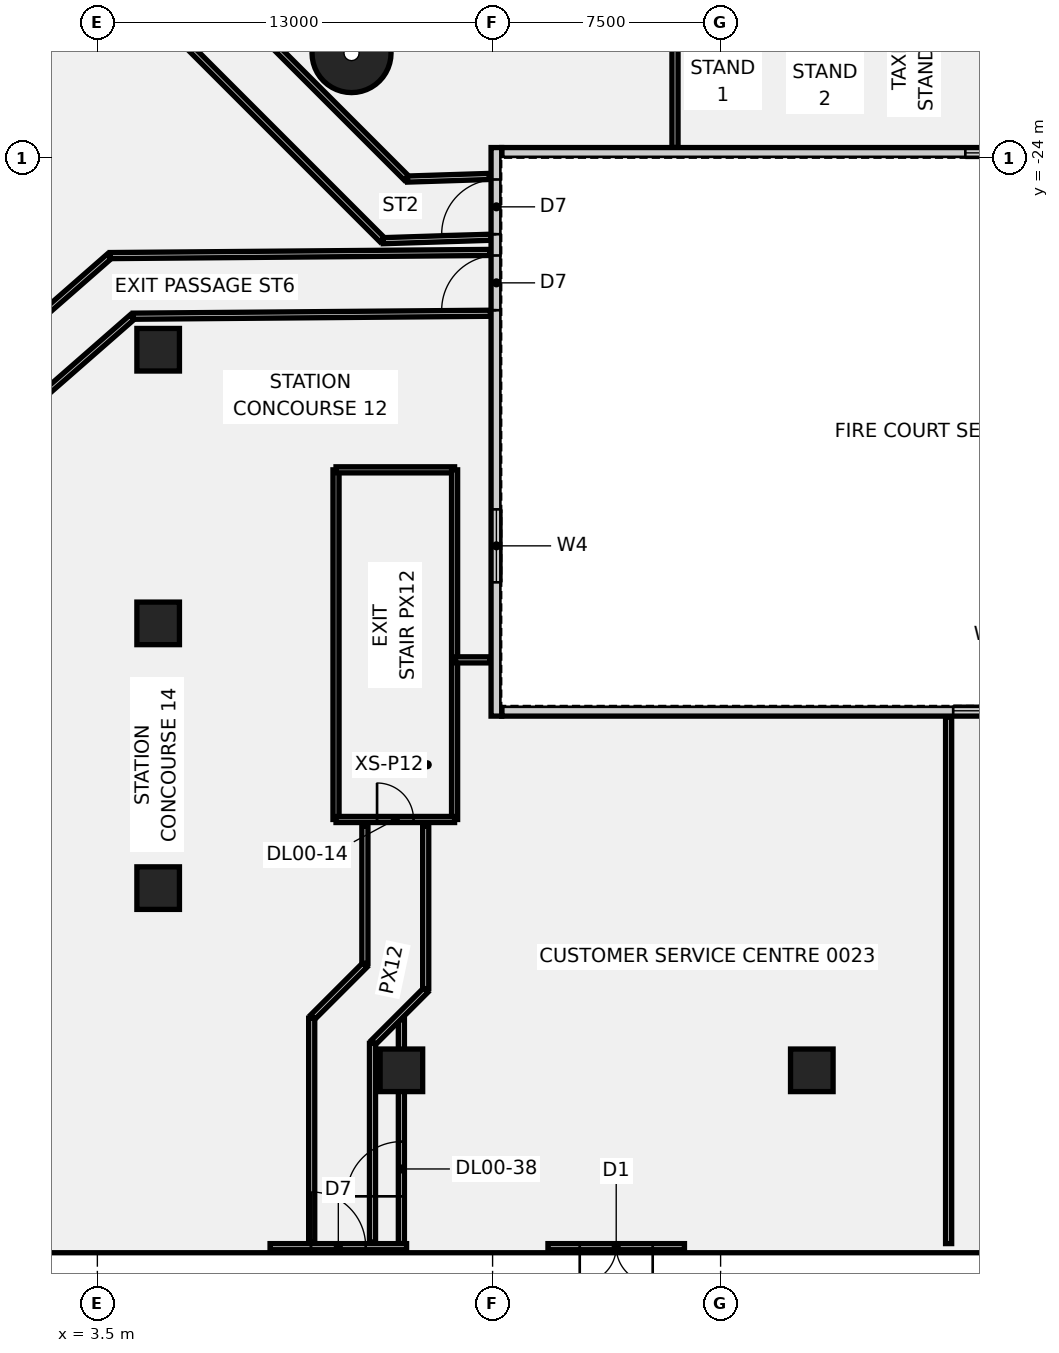
"""IFC4 building model, lengths in metres.
Left out: names, types, materials, properties, quantities, classifications, styles, units other than length and angle.
Written with IfcOpenShell. Run it as: python <this file> out.ifc"""

import sys

from ifc_helpers import new_model, si_unit, direction, frame, frame_2d, origin, origin_2d, place, context, subcontext, project, spatial, rectangle, circle, extrude, element, fill, save


model = new_model("IFC4")
c1 = context("Model", 3, precision=1e-05, world=origin(), true_north=direction((0.0, 1.0)))
c2 = subcontext(c1, "Body", "Model", "MODEL_VIEW")
j1 = project(units=[si_unit("LENGTHUNIT", "METRE"), si_unit("PLANEANGLEUNIT", "RADIAN")], contexts=[c1])
p1 = place(None, origin())
s1 = spatial("IfcSite", under=j1, at=p1, CompositionType="ELEMENT")
p2 = place(p1, origin())
s2 = spatial("IfcBuilding", under=s1, at=p2, CompositionType="ELEMENT")
p3 = place(p2, origin())
s3 = spatial("IfcBuildingStorey", under=s2, at=p3, CompositionType="ELEMENT", Elevation=0.0)
p4 = place(p3, frame((11.86, -20.543, -0.55), z_axis=(0.0, 0.0, 1.0), x_axis=(1.0, 0.0, 0.0)))
e1 = element("IfcColumn", 1, at=p4, inside=s3, PredefinedType="COLUMN", context=c2, shape_type="SweptSolid", body=[
    extrude(circle(Radius=1.3, at=origin_2d()), origin(), (0.0, 0.0, 1.0), 9.05),
])
for number, where, z_axis, x_axis in (
    (2, (5.5, -39.3, -0.55), (0.0, 0.0, 1.0), (1.0, 0.0, 0.0)),
    (3, (5.5, -30.3, -0.55), (0.0, 0.0, 1.0), (1.0, 0.0, 0.0)),
    (4, (5.5, -48.008, -0.55), (0.0, 0.0, 1.0), (1.0, 0.0, 0.0)),
    (5, (13.5, -54.0, -0.55), (0.0, 0.0, 1.0), (1.0, 0.0, 0.0)),
    (6, (27.0, -54.0, -0.55), (0.0, 0.0, 1.0), (1.0, 0.0, 0.0)),
):
    element("IfcColumn", number, at=place(p3, frame(where, z_axis=z_axis, x_axis=x_axis)), inside=s3, PredefinedType="COLUMN", context=c2, shape_type="SweptSolid", body=[
        extrude(rectangle(XDim=1.4, YDim=1.4, at=origin_2d()), origin(), (0.0, 0.0, 1.0), 9.05),
    ])
p5 = place(p3, frame((11.35, -45.75, 0.0), z_axis=(0.0, 0.0, 1.0), x_axis=(0.0, 1.0, 0.0)))
e7 = element("IfcWall", 7, at=p5, inside=s3, PredefinedType="PARTITIONING", context=c2, shape_type="SweptSolid", body=[
    extrude(rectangle(XDim=11.5, YDim=0.2, at=frame_2d((5.75, 0.0))), origin(), (0.0, 0.0, 1.0), 8.5),
])
p6 = place(p3, frame((11.35, -34.25, 0.0), z_axis=(0.0, 0.0, 1.0), x_axis=(1.0, 0.0, 0.0)))
e8 = element("IfcWall", 8, at=p6, inside=s3, PredefinedType="PARTITIONING", context=c2, shape_type="SweptSolid", body=[
    extrude(rectangle(XDim=3.9, YDim=0.2, at=frame_2d((1.95, 0.0))), origin(), (0.0, 0.0, 1.0), 8.5),
])
p7 = place(p3, frame((15.25, -45.75, 0.0), z_axis=(0.0, 0.0, 1.0), x_axis=(0.0, 1.0, 0.0)))
e9 = element("IfcWall", 9, at=p7, inside=s3, PredefinedType="PARTITIONING", context=c2, shape_type="SweptSolid", body=[
    extrude(rectangle(XDim=11.5, YDim=0.2, at=frame_2d((5.75, 0.0))), origin(), (0.0, 0.0, 1.0), 8.5),
])
p8 = place(p3, frame((11.35, -45.75, 0.0), z_axis=(0.0, 0.0, 1.0), x_axis=(1.0, 0.0, 0.0)))
e10 = element("IfcWall", 10, at=p8, inside=s3, PredefinedType="PARTITIONING", context=c2, shape_type="SweptSolid", body=[
    extrude(rectangle(XDim=3.9, YDim=0.2, at=frame_2d((1.95, 0.0))), origin(), (0.0, 0.0, 1.0), 8.5),
])
p9 = place(p8, frame((1.35, 0.0, 0.0)))
e11 = element("IfcOpeningElement", 11, at=p9, cuts=e10, PredefinedType="OPENING", context=c2, shape_type="SweptSolid", body=[
    extrude(rectangle(XDim=1.2, YDim=2.1, at=frame_2d((0.6, 1.05))), frame((0.0, 0.11, 0.0), z_axis=(0.0, -1.0, 0.0), x_axis=(1.0, 0.0, 0.0)), (0.0, 0.0, 1.0), 0.22),
])
p10 = place(p3, frame((13.5, -59.699, 0.0), z_axis=(0.0, 0.0, 1.0), x_axis=(0.0, 1.0, 0.0)))
e12 = element("IfcWall", 12, at=p10, inside=s3, PredefinedType="PARTITIONING", context=c2, shape_type="SweptSolid", body=[
    extrude(rectangle(XDim=7.365, YDim=0.2, at=frame_2d((3.683, 0.0))), origin(), (0.0, 0.0, 1.0), 8.5),
])
p11 = place(p10, frame((1.554, 0.0, 0.0)))
e13 = element("IfcOpeningElement", 13, at=p11, cuts=e12, PredefinedType="OPENING", context=c2, shape_type="SweptSolid", body=[
    extrude(rectangle(XDim=1.8, YDim=2.1, at=frame_2d((0.9, 1.05))), frame((0.0, 0.11, 0.0), z_axis=(0.0, -1.0, 0.0), x_axis=(1.0, 0.0, 0.0)), (0.0, 0.0, 1.0), 0.22),
])
p12 = place(p3, frame((15.28, -40.5, 0.0), z_axis=(0.0, 0.0, 1.0), x_axis=(1.0, 0.0, 0.0)))
e14 = element("IfcWall", 14, at=p12, inside=s3, PredefinedType="PARTITIONING", context=c2, shape_type="SweptSolid", body=[
    extrude(rectangle(XDim=1.14, YDim=0.2, at=frame_2d((0.57, 0.0))), origin(), (0.0, 0.0, 1.0), 8.5),
])
p13 = place(p3, frame((31.5, -59.699, 0.0), z_axis=(0.0, 0.0, 1.0), x_axis=(0.0, 1.0, 0.0)))
e15 = element("IfcWall", 15, at=p13, inside=s3, PredefinedType="PARTITIONING", context=c2, shape_type="SweptSolid", body=[
    extrude(rectangle(XDim=17.319, YDim=0.2, at=frame_2d((8.66, 0.0))), origin(), (0.0, 0.0, 1.0), 8.5),
])
p14 = place(p3, frame((22.5, -18.5, 0.0), z_axis=(0.0, 0.0, 1.0), x_axis=(0.0, -1.0, 0.0)))
e16 = element("IfcWall", 16, at=p14, inside=s3, PredefinedType="PARTITIONING", context=c2, shape_type="SweptSolid", body=[
    extrude(rectangle(XDim=5.15, YDim=0.2, at=frame_2d((2.575, 0.0))), origin(), (0.0, 0.0, 1.0), 8.5),
])
p15 = place(p3, frame((1.124, -29.65, 0.0), z_axis=(0.0, 0.0, 1.0), x_axis=(0.752593197415, 0.658485747154, 0.0)))
e17 = element("IfcWall", 17, at=p15, inside=s3, PredefinedType="PARTITIONING", context=c2, shape_type="SweptSolid", body=[
    extrude(rectangle(XDim=3.666, YDim=0.2, at=frame_2d((1.833, 0.0))), origin(), (0.0, 0.0, 1.0), 8.5),
])
p16 = place(p3, frame((3.921, -27.203, 0.0), z_axis=(0.0, 0.0, 1.0), x_axis=(0.999965985762, 0.008247867521, 0.0)))
e18 = element("IfcWall", 18, at=p16, inside=s3, PredefinedType="PARTITIONING", context=c2, shape_type="SweptSolid", body=[
    extrude(rectangle(XDim=12.491, YDim=0.2, at=frame_2d((6.246, 0.0))), origin(), (0.0, 0.0, 1.0), 8.5),
])
p17 = place(p3, frame((1.876, -31.65, 0.0), z_axis=(0.0, 0.0, 1.0), x_axis=(0.75257257963, 0.658509310784, 0.0)))
e19 = element("IfcWall", 19, at=p17, inside=s3, PredefinedType="PARTITIONING", context=c2, shape_type="SweptSolid", body=[
    extrude(rectangle(XDim=3.675, YDim=0.2, at=frame_2d((1.838, 0.0))), origin(), (0.0, 0.0, 1.0), 8.5),
])
p18 = place(p3, frame((4.679, -29.197, 0.0), z_axis=(0.0, 0.0, 1.0), x_axis=(0.99996597443, 0.008249241373, 0.0)))
e20 = element("IfcWall", 20, at=p18, inside=s3, PredefinedType="PARTITIONING", context=c2, shape_type="SweptSolid", body=[
    extrude(rectangle(XDim=11.75, YDim=0.2, at=frame_2d((5.875, 0.0))), origin(), (0.0, 0.0, 1.0), 8.5),
])
p19 = place(p3, frame((7.738, -18.724, 0.0), z_axis=(0.0, 0.0, 1.0), x_axis=(0.707121343443, -0.70709221863, 0.0)))
e21 = element("IfcWall", 21, at=p19, inside=s3, PredefinedType="PARTITIONING", context=c2, shape_type="SweptSolid", body=[
    extrude(rectangle(XDim=8.383, YDim=0.2, at=frame_2d((4.191, 0.0))), origin(), (0.0, 0.0, 1.0), 8.5),
])
p20 = place(p3, frame((13.701, -24.687, 0.0), z_axis=(0.0, 0.0, 1.0), x_axis=(0.999488950114, 0.031966210289, 0.0)))
e22 = element("IfcWall", 22, at=p20, inside=s3, PredefinedType="PARTITIONING", context=c2, shape_type="SweptSolid", body=[
    extrude(rectangle(XDim=2.688, YDim=0.2, at=frame_2d((1.344, 0.0))), origin(), (0.0, 0.0, 1.0), 8.5),
])
p21 = place(p3, frame((5.862, -19.676, 0.0), z_axis=(0.0, 0.0, 1.0), x_axis=(0.707106781187, -0.707106781187, 0.0)))
e23 = element("IfcWall", 23, at=p21, inside=s3, PredefinedType="PARTITIONING", context=c2, shape_type="SweptSolid", body=[
    extrude(rectangle(XDim=9.902, YDim=0.2, at=frame_2d((4.951, 0.0))), origin(), (0.0, 0.0, 1.0), 8.5),
])
p22 = place(p3, frame((12.899, -26.713, 0.0), z_axis=(0.0, 0.0, 1.0), x_axis=(0.999487091524, 0.032024270122, 0.0)))
e24 = element("IfcWall", 24, at=p22, inside=s3, PredefinedType="PARTITIONING", context=c2, shape_type="SweptSolid", body=[
    extrude(rectangle(XDim=3.552, YDim=0.2, at=frame_2d((1.776, 0.0))), origin(), (0.0, 0.0, 1.0), 8.5),
])
p23 = place(p3, frame((14.3, -45.97, 0.0), z_axis=(0.0, 0.0, 1.0), x_axis=(0.0, -1.0, 0.0)))
e25 = element("IfcWall", 25, at=p23, inside=s3, PredefinedType="PARTITIONING", context=c2, shape_type="SweptSolid", body=[
    extrude(rectangle(XDim=5.344, YDim=0.2, at=frame_2d((2.672, 0.0))), origin(), (0.0, 0.0, 1.0), 8.5),
])
p24 = place(p3, frame((14.3, -51.364, 0.0), z_axis=(0.0, 0.0, 1.0), x_axis=(-0.707106781187, -0.707106781187, 0.0)))
e26 = element("IfcWall", 26, at=p24, inside=s3, PredefinedType="PARTITIONING", context=c2, shape_type="SweptSolid", body=[
    extrude(rectangle(XDim=2.425, YDim=0.2, at=frame_2d((1.212, 0.0))), origin(), (0.0, 0.0, 1.0), 8.5),
])
p25 = place(p3, frame((12.55, -53.114, 0.0), z_axis=(0.0, 0.0, 1.0), x_axis=(0.0, -1.0, 0.0)))
e27 = element("IfcWall", 27, at=p25, inside=s3, PredefinedType="PARTITIONING", context=c2, shape_type="SweptSolid", body=[
    extrude(rectangle(XDim=6.536, YDim=0.2, at=frame_2d((3.268, 0.0))), origin(), (0.0, 0.0, 1.0), 8.5),
])
p26 = place(p3, frame((12.3, -45.97, 0.0), z_axis=(0.0, 0.0, 1.0), x_axis=(0.0, -1.0, 0.0)))
e28 = element("IfcWall", 28, at=p26, inside=s3, PredefinedType="PARTITIONING", context=c2, shape_type="SweptSolid", body=[
    extrude(rectangle(XDim=4.516, YDim=0.2, at=frame_2d((2.258, 0.0))), origin(), (0.0, 0.0, 1.0), 8.5),
])
p27 = place(p3, frame((12.3, -50.536, 0.0), z_axis=(0.0, 0.0, 1.0), x_axis=(-0.707106781187, -0.707106781187, 0.0)))
e29 = element("IfcWall", 29, at=p27, inside=s3, PredefinedType="PARTITIONING", context=c2, shape_type="SweptSolid", body=[
    extrude(rectangle(XDim=2.425, YDim=0.2, at=frame_2d((1.212, 0.0))), origin(), (0.0, 0.0, 1.0), 8.5),
])
p28 = place(p3, frame((10.55, -52.286, 0.0), z_axis=(0.0, 0.0, 1.0), x_axis=(0.0, -1.0, 0.0)))
e30 = element("IfcWall", 30, at=p28, inside=s3, PredefinedType="PARTITIONING", context=c2, shape_type="SweptSolid", body=[
    extrude(rectangle(XDim=7.364, YDim=0.2, at=frame_2d((3.682, 0.0))), origin(), (0.0, 0.0, 1.0), 8.5),
])
p29 = place(p3, frame((9.181, -59.8, 0.0), z_axis=(0.0, 0.0, 1.0), x_axis=(1.0, 0.0, 0.0)))
e31 = element("IfcWall", 31, at=p29, inside=s3, PredefinedType="SOLIDWALL", context=c2, shape_type="SweptSolid", body=[
    extrude(rectangle(XDim=4.49, YDim=0.2, at=frame_2d((2.245, 0.0))), origin(), (0.0, 0.0, 1.0), 2.9),
])
p30 = place(p29, frame((1.345, 0.0, 0.0)))
e32 = element("IfcOpeningElement", 32, at=p30, cuts=e31, PredefinedType="OPENING", context=c2, shape_type="SweptSolid", body=[
    extrude(rectangle(XDim=1.8, YDim=2.4, at=frame_2d((0.9, 1.2))), frame((0.0, 0.11, 0.0), z_axis=(0.0, -1.0, 0.0), x_axis=(1.0, 0.0, 0.0)), (0.0, 0.0, 1.0), 0.22),
])
p31 = place(p3, frame((18.321, -59.8, 0.0), z_axis=(0.0, 0.0, 1.0), x_axis=(1.0, 0.0, 0.0)))
e33 = element("IfcWall", 33, at=p31, inside=s3, PredefinedType="SOLIDWALL", context=c2, shape_type="SweptSolid", body=[
    extrude(rectangle(XDim=4.49, YDim=0.2, at=frame_2d((2.245, 0.0))), origin(), (0.0, 0.0, 1.0), 2.9),
])
p32 = place(p31, frame((1.045, 0.0, 0.0)))
e34 = element("IfcOpeningElement", 34, at=p32, cuts=e33, PredefinedType="OPENING", context=c2, shape_type="SweptSolid", body=[
    extrude(rectangle(XDim=2.4, YDim=2.4, at=frame_2d((1.2, 1.2))), frame((0.0, 0.11, 0.0), z_axis=(0.0, -1.0, 0.0), x_axis=(1.0, 0.0, 0.0)), (0.0, 0.0, 1.0), 0.22),
])
p33 = place(p3, frame((16.8, -42.175, 0.0), z_axis=(0.0, 0.0, 1.0), x_axis=(1.0, 0.0, 0.0)))
e35 = element("IfcWall", 35, at=p33, inside=s3, PredefinedType="SOLIDWALL", context=c2, shape_type="SweptSolid", body=[
    extrude(rectangle(XDim=26.7, YDim=0.35, at=frame_2d((13.35, 0.0))), origin(), (0.0, 0.0, 1.0), 8.5),
])
p34 = place(p33, frame((14.85, 0.0, 1.0)))
e36 = element("IfcOpeningElement", 36, at=p34, cuts=e35, PredefinedType="OPENING", context=c2, shape_type="SweptSolid", body=[
    extrude(rectangle(XDim=2.4, YDim=1.8, at=frame_2d((1.2, 0.9))), frame((0.0, 0.185, 0.0), z_axis=(0.0, -1.0, 0.0), x_axis=(1.0, 0.0, 0.0)), (0.0, 0.0, 1.0), 0.37),
])
p35 = place(p3, frame((16.8, -23.825, 0.0), z_axis=(0.0, 0.0, 1.0), x_axis=(1.0, 0.0, 0.0)))
e37 = element("IfcWall", 37, at=p35, inside=s3, PredefinedType="SOLIDWALL", context=c2, shape_type="SweptSolid", body=[
    extrude(rectangle(XDim=26.7, YDim=0.35, at=frame_2d((13.35, 0.0))), origin(), (0.0, 0.0, 1.0), 8.5),
])
p36 = place(p35, frame((15.25, 0.0, 1.0)))
e38 = element("IfcOpeningElement", 38, at=p36, cuts=e37, PredefinedType="OPENING", context=c2, shape_type="SweptSolid", body=[
    extrude(rectangle(XDim=2.4, YDim=1.8, at=frame_2d((1.2, 0.9))), frame((0.0, 0.185, 0.0), z_axis=(0.0, -1.0, 0.0), x_axis=(1.0, 0.0, 0.0)), (0.0, 0.0, 1.0), 0.37),
])
p37 = place(p3, frame((16.625, -42.35, 0.0), z_axis=(0.0, 0.0, 1.0), x_axis=(0.0, 1.0, 0.0)))
e39 = element("IfcWall", 39, at=p37, inside=s3, PredefinedType="SOLIDWALL", context=c2, shape_type="SweptSolid", body=[
    extrude(rectangle(XDim=18.7, YDim=0.35, at=frame_2d((9.35, 0.0))), origin(), (0.0, 0.0, 1.0), 8.5),
])
p38 = place(p37, frame((13.35, 0.0, 0.0)))
e40 = element("IfcOpeningElement", 40, at=p38, cuts=e39, PredefinedType="OPENING", context=c2, shape_type="SweptSolid", body=[
    extrude(rectangle(XDim=1.8, YDim=2.4, at=frame_2d((0.9, 1.2))), frame((0.0, 0.185, 0.0), z_axis=(0.0, -1.0, 0.0), x_axis=(1.0, 0.0, 0.0)), (0.0, 0.0, 1.0), 0.37),
])
p39 = place(p37, frame((15.85, 0.0, 0.0)))
e41 = element("IfcOpeningElement", 41, at=p39, cuts=e39, PredefinedType="OPENING", context=c2, shape_type="SweptSolid", body=[
    extrude(rectangle(XDim=1.8, YDim=2.4, at=frame_2d((0.9, 1.2))), frame((0.0, 0.185, 0.0), z_axis=(0.0, -1.0, 0.0), x_axis=(1.0, 0.0, 0.0)), (0.0, 0.0, 1.0), 0.37),
])
p40 = place(p37, frame((4.4, 0.0, 1.0)))
e42 = element("IfcOpeningElement", 42, at=p40, cuts=e39, PredefinedType="OPENING", context=c2, shape_type="SweptSolid", body=[
    extrude(rectangle(XDim=2.4, YDim=1.8, at=frame_2d((1.2, 0.9))), frame((0.0, 0.185, 0.0), z_axis=(0.0, -1.0, 0.0), x_axis=(1.0, 0.0, 0.0)), (0.0, 0.0, 1.0), 0.37),
])
p41 = place(p9, origin())
e43 = element("IfcDoor", 43, at=p41, inside=s3, OperationType="SINGLE_SWING_RIGHT", PredefinedType="DOOR", context=c2, shape_type="SweptSolid", body=[
    extrude(rectangle(XDim=1.2, YDim=2.1, at=frame_2d((0.6, 1.05))), frame((0.0, 0.025, 0.0), z_axis=(0.0, -1.0, 0.0), x_axis=(1.0, 0.0, 0.0)), (0.0, 0.0, 1.0), 0.05),
])
fill(e11, e43)
p42 = place(p11, origin())
e44 = element("IfcDoor", 44, at=p42, inside=s3, OperationType="SINGLE_SWING_RIGHT", PredefinedType="DOOR", context=c2, shape_type="SweptSolid", body=[
    extrude(rectangle(XDim=1.8, YDim=2.1, at=frame_2d((0.9, 1.05))), frame((0.0, 0.025, 0.0), z_axis=(0.0, -1.0, 0.0), x_axis=(1.0, 0.0, 0.0)), (0.0, 0.0, 1.0), 0.05),
])
fill(e13, e44)
p43 = place(p30, frame((1.8, 0.0, 0.0), z_axis=(0.0, 0.0, 1.0), x_axis=(-1.0, 0.0, 0.0)))
e45 = element("IfcDoor", 45, at=p43, inside=s3, OperationType="SINGLE_SWING_LEFT", PredefinedType="DOOR", context=c2, shape_type="SweptSolid", body=[
    extrude(rectangle(XDim=1.8, YDim=2.4, at=frame_2d((0.9, 1.2))), frame((0.0, 0.025, 0.0), z_axis=(0.0, -1.0, 0.0), x_axis=(1.0, 0.0, 0.0)), (0.0, 0.0, 1.0), 0.05),
])
fill(e32, e45)
p44 = place(p32, frame((2.4, 0.0, 0.0), z_axis=(0.0, 0.0, 1.0), x_axis=(-1.0, 0.0, 0.0)))
e46 = element("IfcDoor", 46, at=p44, inside=s3, OperationType="DOUBLE_DOOR_DOUBLE_SWING", PredefinedType="DOOR", context=c2, shape_type="SweptSolid", body=[
    extrude(rectangle(XDim=2.4, YDim=2.4, at=frame_2d((1.2, 1.2))), frame((0.0, 0.025, 0.0), z_axis=(0.0, -1.0, 0.0), x_axis=(1.0, 0.0, 0.0)), (0.0, 0.0, 1.0), 0.05),
])
fill(e34, e46)
p45 = place(p34, origin())
e47 = element("IfcWindow", 47, at=p45, inside=s3, PartitioningType="SINGLE_PANEL", PredefinedType="WINDOW", context=c2, shape_type="SweptSolid", body=[
    extrude(rectangle(XDim=2.4, YDim=1.8, at=frame_2d((1.2, 0.9))), frame((0.0, 0.03, 0.0), z_axis=(0.0, -1.0, 0.0), x_axis=(1.0, 0.0, 0.0)), (0.0, 0.0, 1.0), 0.06),
])
fill(e36, e47)
p46 = place(p36, origin())
e48 = element("IfcWindow", 48, at=p46, inside=s3, PartitioningType="SINGLE_PANEL", PredefinedType="WINDOW", context=c2, shape_type="SweptSolid", body=[
    extrude(rectangle(XDim=2.4, YDim=1.8, at=frame_2d((1.2, 0.9))), frame((0.0, 0.03, 0.0), z_axis=(0.0, -1.0, 0.0), x_axis=(1.0, 0.0, 0.0)), (0.0, 0.0, 1.0), 0.06),
])
fill(e38, e48)
p47 = place(p38, frame((1.8, 0.0, 0.0), z_axis=(0.0, 0.0, 1.0), x_axis=(-1.0, 0.0, 0.0)))
e49 = element("IfcDoor", 49, at=p47, inside=s3, OperationType="SINGLE_SWING_LEFT", PredefinedType="DOOR", context=c2, shape_type="SweptSolid", body=[
    extrude(rectangle(XDim=1.8, YDim=2.4, at=frame_2d((0.9, 1.2))), frame((0.0, 0.025, 0.0), z_axis=(0.0, -1.0, 0.0), x_axis=(1.0, 0.0, 0.0)), (0.0, 0.0, 1.0), 0.05),
])
fill(e40, e49)
p48 = place(p39, frame((1.8, 0.0, 0.0), z_axis=(0.0, 0.0, 1.0), x_axis=(-1.0, 0.0, 0.0)))
e50 = element("IfcDoor", 50, at=p48, inside=s3, OperationType="SINGLE_SWING_LEFT", PredefinedType="DOOR", context=c2, shape_type="SweptSolid", body=[
    extrude(rectangle(XDim=1.8, YDim=2.4, at=frame_2d((0.9, 1.2))), frame((0.0, 0.025, 0.0), z_axis=(0.0, -1.0, 0.0), x_axis=(1.0, 0.0, 0.0)), (0.0, 0.0, 1.0), 0.05),
])
fill(e41, e50)
p49 = place(p40, origin())
e51 = element("IfcWindow", 51, at=p49, inside=s3, PartitioningType="SINGLE_PANEL", PredefinedType="WINDOW", context=c2, shape_type="SweptSolid", body=[
    extrude(rectangle(XDim=2.4, YDim=1.8, at=frame_2d((1.2, 0.9))), frame((0.0, 0.03, 0.0), z_axis=(0.0, -1.0, 0.0), x_axis=(1.0, 0.0, 0.0)), (0.0, 0.0, 1.0), 0.06),
])
fill(e42, e51)
save(model, sys.argv[1])
